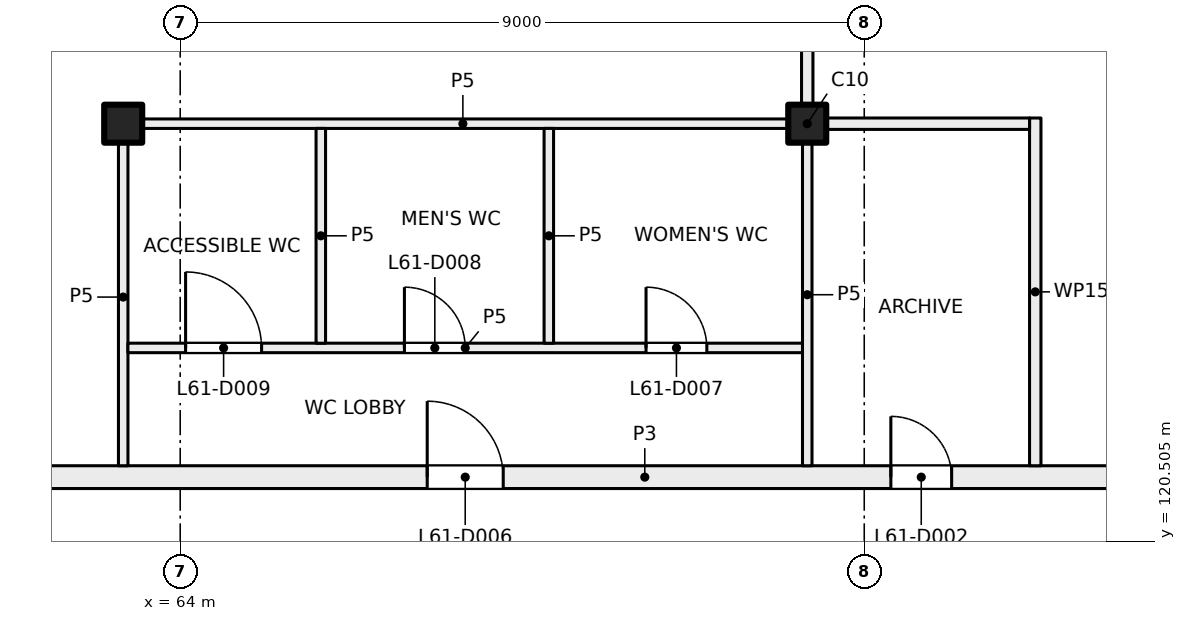
"""IFC4 building model, lengths in metres.
Left out: names, types, materials, properties, quantities, classifications, styles, units other than length and angle.
Written with IfcOpenShell. Run it as: python <this file> out.ifc"""

import sys

from ifc_helpers import new_model, si_unit, direction, frame, frame_2d, origin, origin_2d, place, context, subcontext, project, spatial, rectangle, extrude, element, fill, save


model = new_model("IFC4")
c1 = context("Model", 3, precision=1e-05, world=origin(), true_north=direction((0.0, 1.0)))
c2 = subcontext(c1, "Body", "Model", "MODEL_VIEW")
j1 = project(units=[si_unit("LENGTHUNIT", "METRE"), si_unit("PLANEANGLEUNIT", "RADIAN")], contexts=[c1])
p1 = place(None, origin())
s1 = spatial("IfcSite", under=j1, at=p1, CompositionType="ELEMENT")
p2 = place(p1, origin())
s2 = spatial("IfcBuilding", under=s1, at=p2, CompositionType="ELEMENT")
p3 = place(p2, frame((0.0, 0.0, 257.5)))
s3 = spatial("IfcBuildingStorey", under=s2, at=p3, CompositionType="ELEMENT", Elevation=257.5)
for number, where, z_axis, x_axis in (
    (1, (63.25, 126.0, 0.0), (0.0, 0.0, 1.0), (1.0, 0.0, 0.0)),
    (2, (72.25, 126.0, 0.0), (0.0, 0.0, 1.0), (1.0, 0.0, 0.0)),
):
    element("IfcColumn", number, at=place(p3, frame(where, z_axis=z_axis, x_axis=x_axis)), inside=s3, PredefinedType="COLUMN", context=c2, shape_type="SweptSolid", body=[
        extrude(rectangle(XDim=0.5, YDim=0.5, at=origin_2d()), origin(), (0.0, 0.0, 1.0), 4.0),
    ])
p4 = place(p3, frame((54.4, 121.35, 0.0), z_axis=(0.0, 0.0, 1.0), x_axis=(1.0, 0.0, 0.0)))
e3 = element("IfcWall", 3, at=p4, inside=s3, PredefinedType="PARTITIONING", context=c2, shape_type="SweptSolid", body=[
    extrude(rectangle(XDim=31.425, YDim=0.3, at=frame_2d((15.712, 0.0))), origin(), (0.0, 0.0, 1.0), 3.625),
])
p5 = place(p4, frame((18.95, 0.0, 0.0)))
e4 = element("IfcOpeningElement", 4, at=p5, cuts=e3, PredefinedType="OPENING", context=c2, shape_type="SweptSolid", body=[
    extrude(rectangle(XDim=0.8, YDim=2.1, at=frame_2d((0.4, 1.05))), frame((0.0, 0.16, 0.0), z_axis=(0.0, -1.0, 0.0), x_axis=(1.0, 0.0, 0.0)), (0.0, 0.0, 1.0), 0.32),
])
p6 = place(p4, frame((25.2, 0.0, 0.0)))
e5 = element("IfcOpeningElement", 5, at=p6, cuts=e3, PredefinedType="OPENING", context=c2, shape_type="SweptSolid", body=[
    extrude(rectangle(XDim=1.8, YDim=2.1, at=frame_2d((0.9, 1.05))), frame((0.0, 0.16, 0.0), z_axis=(0.0, -1.0, 0.0), x_axis=(1.0, 0.0, 0.0)), (0.0, 0.0, 1.0), 0.32),
])
p7 = place(p4, frame((12.85, 0.0, 0.0)))
e6 = element("IfcOpeningElement", 6, at=p7, cuts=e3, PredefinedType="OPENING", context=c2, shape_type="SweptSolid", body=[
    extrude(rectangle(XDim=1.0, YDim=2.1, at=frame_2d((0.5, 1.05))), frame((0.0, 0.16, 0.0), z_axis=(0.0, -1.0, 0.0), x_axis=(1.0, 0.0, 0.0)), (0.0, 0.0, 1.0), 0.32),
])
p8 = place(p4, frame((3.515, 0.0, 0.0)))
e7 = element("IfcOpeningElement", 7, at=p8, cuts=e3, PredefinedType="OPENING", context=c2, shape_type="SweptSolid", body=[
    extrude(rectangle(XDim=1.8, YDim=2.1, at=frame_2d((0.9, 1.05))), frame((0.0, 0.16, 0.0), z_axis=(0.0, -1.0, 0.0), x_axis=(1.0, 0.0, 0.0)), (0.0, 0.0, 1.0), 0.32),
])
p9 = place(p3, frame((63.25, 121.5, 0.0), z_axis=(0.0, 0.0, 1.0), x_axis=(0.0, 1.0, 0.0)))
e8 = element("IfcWall", 8, at=p9, inside=s3, PredefinedType="PARTITIONING", context=c2, shape_type="SweptSolid", body=[
    extrude(rectangle(XDim=4.438, YDim=0.125, at=frame_2d((2.219, 0.0))), origin(), (0.0, 0.0, 1.0), 3.625),
])
p10 = place(p3, frame((63.312, 123.05, 0.0), z_axis=(0.0, 0.0, 1.0), x_axis=(1.0, 0.0, 0.0)))
e9 = element("IfcWall", 9, at=p10, inside=s3, PredefinedType="PARTITIONING", context=c2, shape_type="SweptSolid", body=[
    extrude(rectangle(XDim=8.876, YDim=0.125, at=frame_2d((4.438, 0.0))), origin(), (0.0, 0.0, 1.0), 3.625),
])
p11 = place(p10, frame((6.817, 0.0, 0.0)))
e10 = element("IfcOpeningElement", 10, at=p11, cuts=e9, PredefinedType="OPENING", context=c2, shape_type="SweptSolid", body=[
    extrude(rectangle(XDim=0.8, YDim=2.1, at=frame_2d((0.4, 1.05))), frame((0.0, 0.073, 0.0), z_axis=(0.0, -1.0, 0.0), x_axis=(1.0, 0.0, 0.0)), (0.0, 0.0, 1.0), 0.145),
])
p12 = place(p10, frame((3.638, 0.0, 0.0)))
e11 = element("IfcOpeningElement", 11, at=p12, cuts=e9, PredefinedType="OPENING", context=c2, shape_type="SweptSolid", body=[
    extrude(rectangle(XDim=0.8, YDim=2.1, at=frame_2d((0.4, 1.05))), frame((0.0, 0.073, 0.0), z_axis=(0.0, -1.0, 0.0), x_axis=(1.0, 0.0, 0.0)), (0.0, 0.0, 1.0), 0.145),
])
p13 = place(p10, frame((0.759, 0.0, 0.0)))
e12 = element("IfcOpeningElement", 12, at=p13, cuts=e9, PredefinedType="OPENING", context=c2, shape_type="SweptSolid", body=[
    extrude(rectangle(XDim=1.0, YDim=2.1, at=frame_2d((0.5, 1.05))), frame((0.0, 0.073, 0.0), z_axis=(0.0, -1.0, 0.0), x_axis=(1.0, 0.0, 0.0)), (0.0, 0.0, 1.0), 0.145),
])
p14 = place(p3, frame((63.188, 126.0, 0.0), z_axis=(0.0, 0.0, 1.0), x_axis=(1.0, 0.0, 0.0)))
e13 = element("IfcWall", 13, at=p14, inside=s3, PredefinedType="PARTITIONING", context=c2, shape_type="SweptSolid", body=[
    extrude(rectangle(XDim=9.062, YDim=0.125, at=frame_2d((4.531, 0.0))), origin(), (0.0, 0.0, 1.0), 3.625),
])
for number, where, z_axis, x_axis in (
    (14, (65.85, 125.938, 0.0), (0.0, 0.0, 1.0), (0.0, -1.0, 0.0)),
    (15, (68.85, 125.938, 0.0), (0.0, 0.0, 1.0), (0.0, -1.0, 0.0)),
):
    element("IfcWall", number, at=place(p3, frame(where, z_axis=z_axis, x_axis=x_axis)), inside=s3, PredefinedType="PARTITIONING", context=c2, shape_type="SweptSolid", body=[
        extrude(rectangle(XDim=2.826, YDim=0.125, at=frame_2d((1.413, 0.0))), origin(), (0.0, 0.0, 1.0), 3.625),
    ])
p15 = place(p3, frame((72.25, 126.0, 0.0), z_axis=(0.0, 0.0, 1.0), x_axis=(0.0, -1.0, 0.0)))
e16 = element("IfcWall", 16, at=p15, inside=s3, PredefinedType="PARTITIONING", context=c2, shape_type="SweptSolid", body=[
    extrude(rectangle(XDim=4.5, YDim=0.125, at=frame_2d((2.25, 0.0))), origin(), (0.0, 0.0, 1.0), 3.625),
])
p16 = place(p3, frame((72.25, 126.0, 0.0), z_axis=(0.0, 0.0, 1.0), x_axis=(0.0, 1.0, 0.0)))
e17 = element("IfcWall", 17, at=p16, inside=s3, PredefinedType="PARTITIONING", context=c2, shape_type="SweptSolid", body=[
    extrude(rectangle(XDim=3.9, YDim=0.15, at=frame_2d((1.95, 0.0))), origin(), (0.0, 0.0, 1.0), 3.625),
])
p17 = place(p3, frame((75.25, 121.5, 0.0), z_axis=(0.0, 0.0, 1.0), x_axis=(0.0, 1.0, 0.0)))
e18 = element("IfcWall", 18, at=p17, inside=s3, PredefinedType="PARTITIONING", context=c2, shape_type="SweptSolid", body=[
    extrude(rectangle(XDim=4.575, YDim=0.15, at=frame_2d((2.288, 0.0))), origin(), (0.0, 0.0, 1.0), 3.625),
])
p18 = place(p3, frame((75.175, 126.0, 0.0), z_axis=(0.0, 0.0, 1.0), x_axis=(-1.0, 0.0, 0.0)))
e19 = element("IfcWall", 19, at=p18, inside=s3, PredefinedType="PARTITIONING", context=c2, shape_type="SweptSolid", body=[
    extrude(rectangle(XDim=2.925, YDim=0.15, at=frame_2d((1.462, 0.0))), origin(), (0.0, 0.0, 1.0), 3.625),
])
p19 = place(p5, origin())
e20 = element("IfcDoor", 20, at=p19, inside=s3, OperationType="SINGLE_SWING_LEFT", PredefinedType="DOOR", context=c2, shape_type="SweptSolid", body=[
    extrude(rectangle(XDim=0.8, YDim=2.1, at=frame_2d((0.4, 1.05))), frame((0.0, 0.025, 0.0), z_axis=(0.0, -1.0, 0.0), x_axis=(1.0, 0.0, 0.0)), (0.0, 0.0, 1.0), 0.05),
])
fill(e4, e20)
p20 = place(p7, origin())
e21 = element("IfcDoor", 21, at=p20, inside=s3, OperationType="SINGLE_SWING_LEFT", PredefinedType="DOOR", context=c2, shape_type="SweptSolid", body=[
    extrude(rectangle(XDim=1.0, YDim=2.1, at=frame_2d((0.5, 1.05))), frame((0.0, 0.025, 0.0), z_axis=(0.0, -1.0, 0.0), x_axis=(1.0, 0.0, 0.0)), (0.0, 0.0, 1.0), 0.05),
])
fill(e6, e21)
p21 = place(p11, origin())
e22 = element("IfcDoor", 22, at=p21, inside=s3, OperationType="SINGLE_SWING_RIGHT", PredefinedType="DOOR", context=c2, shape_type="SweptSolid", body=[
    extrude(rectangle(XDim=0.8, YDim=2.1, at=frame_2d((0.4, 1.05))), frame((0.0, 0.025, 0.0), z_axis=(0.0, -1.0, 0.0), x_axis=(1.0, 0.0, 0.0)), (0.0, 0.0, 1.0), 0.05),
])
fill(e10, e22)
p22 = place(p12, origin())
e23 = element("IfcDoor", 23, at=p22, inside=s3, OperationType="SINGLE_SWING_LEFT", PredefinedType="DOOR", context=c2, shape_type="SweptSolid", body=[
    extrude(rectangle(XDim=0.8, YDim=2.1, at=frame_2d((0.4, 1.05))), frame((0.0, 0.025, 0.0), z_axis=(0.0, -1.0, 0.0), x_axis=(1.0, 0.0, 0.0)), (0.0, 0.0, 1.0), 0.05),
])
fill(e11, e23)
p23 = place(p13, origin())
e24 = element("IfcDoor", 24, at=p23, inside=s3, OperationType="SINGLE_SWING_LEFT", PredefinedType="DOOR", context=c2, shape_type="SweptSolid", body=[
    extrude(rectangle(XDim=1.0, YDim=2.1, at=frame_2d((0.5, 1.05))), frame((0.0, 0.025, 0.0), z_axis=(0.0, -1.0, 0.0), x_axis=(1.0, 0.0, 0.0)), (0.0, 0.0, 1.0), 0.05),
])
fill(e12, e24)
save(model, sys.argv[1])
